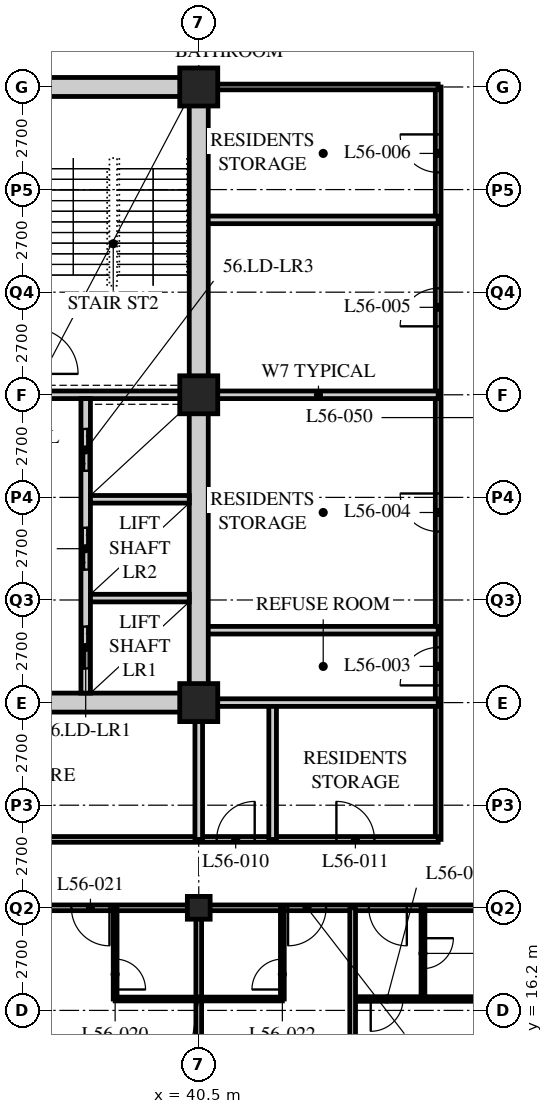
"""IFC4 building model, lengths in metres.
Left out: names, types, materials, properties, quantities, classifications, styles, units other than length and angle.
Written with IfcOpenShell. Run it as: python <this file> out.ifc"""

import sys

from ifc_helpers import new_model, si_unit, direction, frame, frame_2d, origin, origin_2d, place, context, subcontext, project, spatial, rectangle, hollow_rectangle, extrude, element, fill, save


model = new_model("IFC4")
c1 = context("Model", 3, precision=1e-05, world=origin(), true_north=direction((0.0, 1.0)))
c2 = subcontext(c1, "Body", "Model", "MODEL_VIEW")
j1 = project(units=[si_unit("LENGTHUNIT", "METRE"), si_unit("PLANEANGLEUNIT", "RADIAN")], contexts=[c1])
p1 = place(None, origin())
s1 = spatial("IfcSite", under=j1, at=p1, CompositionType="ELEMENT")
p2 = place(p1, origin())
s2 = spatial("IfcBuilding", under=s1, at=p2, CompositionType="ELEMENT")
p3 = place(p2, frame((0.0, 0.0, 217.2)))
s3 = spatial("IfcBuildingStorey", under=s2, at=p3, CompositionType="ELEMENT", Elevation=217.2)
p4 = place(p3, frame((40.5, 18.9, 0.0), z_axis=(0.0, 0.0, 1.0), x_axis=(1.0, 0.0, 0.0)))
e1 = element("IfcColumn", 1, at=p4, inside=s3, PredefinedType="COLUMN", context=c2, shape_type="SweptSolid", body=[
    extrude(hollow_rectangle(XDim=0.6, YDim=0.6, WallThickness=0.05, at=origin_2d()), origin(), (0.0, 0.0, 1.0), 3.6),
])
for number, where, z_axis, x_axis in (
    (2, (40.5, 24.3, 0.0), (0.0, 0.0, 1.0), (1.0, 0.0, 0.0)),
    (3, (40.5, 32.4, 0.0), (0.0, 0.0, 1.0), (1.0, 0.0, 0.0)),
    (4, (40.5, 40.5, 0.0), (0.0, 0.0, 1.0), (1.0, 0.0, 0.0)),
):
    element("IfcColumn", number, at=place(p3, frame(where, z_axis=z_axis, x_axis=x_axis)), inside=s3, PredefinedType="COLUMN", context=c2, shape_type="SweptSolid", body=[
        extrude(hollow_rectangle(XDim=1.0, YDim=1.0, WallThickness=0.1, at=origin_2d()), origin(), (0.0, 0.0, 1.0), 3.6),
    ])
p5 = place(p3, frame((12.15, 18.9, 0.0), z_axis=(0.0, 0.0, 1.0), x_axis=(1.0, 0.0, 0.0)))
e5 = element("IfcWall", 5, at=p5, inside=s3, PredefinedType="PARTITIONING", context=c2, shape_type="SweptSolid", body=[
    extrude(rectangle(XDim=36.45, YDim=0.15, at=frame_2d((18.225, 0.0))), origin(), (0.0, 0.0, 1.0), 2.778),
])
p6 = place(p5, frame((4.95, 0.0, 0.0)))
e6 = element("IfcOpeningElement", 6, at=p6, cuts=e5, PredefinedType="OPENING", context=c2, shape_type="SweptSolid", body=[
    extrude(rectangle(XDim=1.0, YDim=2.1, at=frame_2d((0.5, 1.05))), frame((0.0, 0.085, 0.0), z_axis=(0.0, -1.0, 0.0), x_axis=(1.0, 0.0, 0.0)), (0.0, 0.0, 1.0), 0.17),
])
p7 = place(p5, frame((22.6, 0.0, 0.0)))
e7 = element("IfcOpeningElement", 7, at=p7, cuts=e5, PredefinedType="OPENING", context=c2, shape_type="SweptSolid", body=[
    extrude(rectangle(XDim=1.0, YDim=2.1, at=frame_2d((0.5, 1.05))), frame((0.0, 0.085, 0.0), z_axis=(0.0, -1.0, 0.0), x_axis=(1.0, 0.0, 0.0)), (0.0, 0.0, 1.0), 0.17),
])
p8 = place(p5, frame((25.0, 0.0, 0.0)))
e8 = element("IfcOpeningElement", 8, at=p8, cuts=e5, PredefinedType="OPENING", context=c2, shape_type="SweptSolid", body=[
    extrude(rectangle(XDim=1.0, YDim=2.1, at=frame_2d((0.5, 1.05))), frame((0.0, 0.085, 0.0), z_axis=(0.0, -1.0, 0.0), x_axis=(1.0, 0.0, 0.0)), (0.0, 0.0, 1.0), 0.17),
])
p9 = place(p5, frame((30.7, 0.0, 0.0)))
e9 = element("IfcOpeningElement", 9, at=p9, cuts=e5, PredefinedType="OPENING", context=c2, shape_type="SweptSolid", body=[
    extrude(rectangle(XDim=1.0, YDim=2.1, at=frame_2d((0.5, 1.05))), frame((0.0, 0.085, 0.0), z_axis=(0.0, -1.0, 0.0), x_axis=(1.0, 0.0, 0.0)), (0.0, 0.0, 1.0), 0.17),
])
p10 = place(p5, frame((1.525, 0.0, 0.0)))
e10 = element("IfcOpeningElement", 10, at=p10, cuts=e5, PredefinedType="OPENING", context=c2, shape_type="SweptSolid", body=[
    extrude(rectangle(XDim=1.0, YDim=2.1, at=frame_2d((0.5, 1.05))), frame((0.0, 0.085, 0.0), z_axis=(0.0, -1.0, 0.0), x_axis=(1.0, 0.0, 0.0)), (0.0, 0.0, 1.0), 0.17),
])
p11 = place(p5, frame((32.825, 0.0, 0.0)))
e11 = element("IfcOpeningElement", 11, at=p11, cuts=e5, PredefinedType="OPENING", context=c2, shape_type="SweptSolid", body=[
    extrude(rectangle(XDim=1.0, YDim=2.1, at=frame_2d((0.5, 1.05))), frame((0.0, 0.085, 0.0), z_axis=(0.0, -1.0, 0.0), x_axis=(1.0, 0.0, 0.0)), (0.0, 0.0, 1.0), 0.17),
])
p12 = place(p3, frame((46.8, 20.7, 0.0), z_axis=(0.0, 0.0, 1.0), x_axis=(0.0, 1.0, 0.0)))
e12 = element("IfcWall", 12, at=p12, inside=s3, PredefinedType="PARTITIONING", context=c2, shape_type="SweptSolid", body=[
    extrude(rectangle(XDim=19.8, YDim=0.15, at=frame_2d((9.9, 0.0))), origin(), (0.0, 0.0, 1.0), 3.39),
])
p13 = place(p12, frame((4.052, 0.0, 0.0)))
e13 = element("IfcOpeningElement", 13, at=p13, cuts=e12, PredefinedType="OPENING", context=c2, shape_type="SweptSolid", body=[
    extrude(rectangle(XDim=1.0, YDim=2.1, at=frame_2d((0.5, 1.05))), frame((0.0, 0.085, 0.0), z_axis=(0.0, -1.0, 0.0), x_axis=(1.0, 0.0, 0.0)), (0.0, 0.0, 1.0), 0.17),
])
p14 = place(p12, frame((8.102, 0.0, 0.0)))
e14 = element("IfcOpeningElement", 14, at=p14, cuts=e12, PredefinedType="OPENING", context=c2, shape_type="SweptSolid", body=[
    extrude(rectangle(XDim=1.0, YDim=2.1, at=frame_2d((0.5, 1.05))), frame((0.0, 0.085, 0.0), z_axis=(0.0, -1.0, 0.0), x_axis=(1.0, 0.0, 0.0)), (0.0, 0.0, 1.0), 0.17),
])
p15 = place(p12, frame((13.502, 0.0, 0.0)))
e15 = element("IfcOpeningElement", 15, at=p15, cuts=e12, PredefinedType="OPENING", context=c2, shape_type="SweptSolid", body=[
    extrude(rectangle(XDim=1.0, YDim=2.1, at=frame_2d((0.5, 1.05))), frame((0.0, 0.085, 0.0), z_axis=(0.0, -1.0, 0.0), x_axis=(1.0, 0.0, 0.0)), (0.0, 0.0, 1.0), 0.17),
])
p16 = place(p12, frame((17.552, 0.0, 0.0)))
e16 = element("IfcOpeningElement", 16, at=p16, cuts=e12, PredefinedType="OPENING", context=c2, shape_type="SweptSolid", body=[
    extrude(rectangle(XDim=1.0, YDim=2.1, at=frame_2d((0.5, 1.05))), frame((0.0, 0.085, 0.0), z_axis=(0.0, -1.0, 0.0), x_axis=(1.0, 0.0, 0.0)), (0.0, 0.0, 1.0), 0.17),
])
p17 = place(p3, frame((46.8, 40.5, 0.0), z_axis=(0.0, 0.0, 1.0), x_axis=(-1.0, 0.0, 0.0)))
e17 = element("IfcWall", 17, at=p17, inside=s3, PredefinedType="PARTITIONING", context=c2, shape_type="SweptSolid", body=[
    extrude(rectangle(XDim=6.1, YDim=0.15, at=frame_2d((3.05, 0.0))), origin(), (0.0, 0.0, 1.0), 3.39),
])
p18 = place(p3, frame((29.56, 20.7, 0.0), z_axis=(0.0, 0.0, 1.0), x_axis=(1.0, 0.0, 0.0)))
e18 = element("IfcWall", 18, at=p18, inside=s3, PredefinedType="PARTITIONING", context=c2, shape_type="SweptSolid", body=[
    extrude(rectangle(XDim=17.24, YDim=0.15, at=frame_2d((8.62, 0.0))), origin(), (0.0, 0.0, 1.0), 3.39),
])
p19 = place(p18, frame((4.965, 0.0, 0.0)))
e19 = element("IfcOpeningElement", 19, at=p19, cuts=e18, PredefinedType="OPENING", context=c2, shape_type="SweptSolid", body=[
    extrude(rectangle(XDim=1.0, YDim=2.1, at=frame_2d((0.5, 1.05))), frame((0.0, 0.085, 0.0), z_axis=(0.0, -1.0, 0.0), x_axis=(1.0, 0.0, 0.0)), (0.0, 0.0, 1.0), 0.17),
])
p20 = place(p18, frame((11.412, 0.0, 0.0)))
e20 = element("IfcOpeningElement", 20, at=p20, cuts=e18, PredefinedType="OPENING", context=c2, shape_type="SweptSolid", body=[
    extrude(rectangle(XDim=1.0, YDim=2.1, at=frame_2d((0.5, 1.05))), frame((0.0, 0.085, 0.0), z_axis=(0.0, -1.0, 0.0), x_axis=(1.0, 0.0, 0.0)), (0.0, 0.0, 1.0), 0.17),
])
p21 = place(p18, frame((14.562, 0.0, 0.0)))
e21 = element("IfcOpeningElement", 21, at=p21, cuts=e18, PredefinedType="OPENING", context=c2, shape_type="SweptSolid", body=[
    extrude(rectangle(XDim=1.0, YDim=2.1, at=frame_2d((0.5, 1.05))), frame((0.0, 0.085, 0.0), z_axis=(0.0, -1.0, 0.0), x_axis=(1.0, 0.0, 0.0)), (0.0, 0.0, 1.0), 0.17),
])
for number, where, z_axis, x_axis in (
    (22, (40.5, 32.4, 0.0), (0.0, 0.0, 1.0), (1.0, 0.0, 0.0)),
    (23, (46.8, 26.205, 0.0), (0.0, 0.0, 1.0), (-1.0, 0.0, 0.0)),
    (24, (46.8, 37.003, 0.0), (0.0, 0.0, 1.0), (-1.0, 0.0, 0.0)),
):
    element("IfcWall", number, at=place(p3, frame(where, z_axis=z_axis, x_axis=x_axis)), inside=s3, PredefinedType="SOLIDWALL", context=c2, shape_type="SweptSolid", body=[
        extrude(rectangle(XDim=6.3, YDim=0.2, at=frame_2d((3.15, 0.0))), origin(), (0.0, 0.0, 1.0), 3.39),
    ])
p22 = place(p3, frame((40.5, 20.7, 0.0), z_axis=(0.0, 0.0, 1.0), x_axis=(0.0, 1.0, 0.0)))
e25 = element("IfcWall", 25, at=p22, inside=s3, PredefinedType="SOLIDWALL", context=c2, shape_type="SweptSolid", body=[
    extrude(rectangle(XDim=3.6, YDim=0.2, at=frame_2d((1.8, 0.0))), origin(), (0.0, 0.0, 1.0), 2.778),
])
p23 = place(p3, frame((42.444, 20.7, 0.0), z_axis=(0.0, 0.0, 1.0), x_axis=(0.0, 1.0, 0.0)))
e26 = element("IfcWall", 26, at=p23, inside=s3, PredefinedType="SOLIDWALL", context=c2, shape_type="SweptSolid", body=[
    extrude(rectangle(XDim=3.6, YDim=0.2, at=frame_2d((1.8, 0.0))), origin(), (0.0, 0.0, 1.0), 3.39),
])
p24 = place(p3, frame((40.5, 24.3, 0.0), z_axis=(0.0, 0.0, 1.0), x_axis=(1.0, 0.0, 0.0)))
e27 = element("IfcWall", 27, at=p24, inside=s3, PredefinedType="SOLIDWALL", context=c2, shape_type="SweptSolid", body=[
    extrude(rectangle(XDim=6.3, YDim=0.2, at=frame_2d((3.15, 0.0))), origin(), (0.0, 0.0, 1.0), 3.39),
])
p25 = place(p3, frame((38.3, 16.5, 0.0), z_axis=(0.0, 0.0, 1.0), x_axis=(1.0, 0.0, 0.0)))
e28 = element("IfcWall", 28, at=p25, inside=s3, PredefinedType="PARTITIONING", context=c2, shape_type="SweptSolid", body=[
    extrude(rectangle(XDim=4.4, YDim=0.1, at=frame_2d((2.2, 0.0))), origin(), (0.0, 0.0, 1.0), 3.39),
])
p26 = place(p3, frame((38.3, 18.9, 0.0), z_axis=(0.0, 0.0, 1.0), x_axis=(0.0, -1.0, 0.0)))
e29 = element("IfcWall", 29, at=p26, inside=s3, PredefinedType="PARTITIONING", context=c2, shape_type="SweptSolid", body=[
    extrude(rectangle(XDim=2.4, YDim=0.1, at=frame_2d((1.2, 0.0))), origin(), (0.0, 0.0, 1.0), 3.39),
])
p27 = place(p26, frame((1.35, 0.0, 0.0)))
e30 = element("IfcOpeningElement", 30, at=p27, cuts=e29, PredefinedType="OPENING", context=c2, shape_type="SweptSolid", body=[
    extrude(rectangle(XDim=0.8, YDim=2.1, at=frame_2d((0.4, 1.05))), frame((0.0, 0.06, 0.0), z_axis=(0.0, -1.0, 0.0), x_axis=(1.0, 0.0, 0.0)), (0.0, 0.0, 1.0), 0.12),
])
p28 = place(p3, frame((40.5, 18.9, 0.0), z_axis=(0.0, 0.0, 1.0), x_axis=(0.0, -1.0, 0.0)))
e31 = element("IfcWall", 31, at=p28, inside=s3, PredefinedType="PARTITIONING", context=c2, shape_type="SweptSolid", body=[
    extrude(rectangle(XDim=7.8, YDim=0.15, at=frame_2d((3.9, 0.0))), origin(), (0.0, 0.0, 1.0), 2.778),
])
p29 = place(p3, frame((42.7, 18.9, 0.0), z_axis=(0.0, 0.0, 1.0), x_axis=(0.0, -1.0, 0.0)))
e32 = element("IfcWall", 32, at=p29, inside=s3, PredefinedType="PARTITIONING", context=c2, shape_type="SweptSolid", body=[
    extrude(rectangle(XDim=2.4, YDim=0.1, at=frame_2d((1.2, 0.0))), origin(), (0.0, 0.0, 1.0), 3.39),
])
p30 = place(p29, frame((1.35, 0.0, 0.0)))
e33 = element("IfcOpeningElement", 33, at=p30, cuts=e32, PredefinedType="OPENING", context=c2, shape_type="SweptSolid", body=[
    extrude(rectangle(XDim=0.8, YDim=2.1, at=frame_2d((0.4, 1.05))), frame((0.0, 0.06, 0.0), z_axis=(0.0, -1.0, 0.0), x_axis=(1.0, 0.0, 0.0)), (0.0, 0.0, 1.0), 0.12),
])
p31 = place(p3, frame((44.55, 16.5, 0.0), z_axis=(0.0, 0.0, 1.0), x_axis=(1.0, 0.0, 0.0)))
e34 = element("IfcWall", 34, at=p31, inside=s3, PredefinedType="PARTITIONING", context=c2, shape_type="SweptSolid", body=[
    extrude(rectangle(XDim=4.05, YDim=0.12, at=frame_2d((2.025, 0.0))), origin(), (0.0, 0.0, 1.0), 3.39),
])
p32 = place(p31, frame((0.475, 0.0, 0.0)))
e35 = element("IfcOpeningElement", 35, at=p32, cuts=e34, PredefinedType="OPENING", context=c2, shape_type="SweptSolid", body=[
    extrude(rectangle(XDim=0.85, YDim=2.1, at=frame_2d((0.425, 1.05))), frame((0.0, 0.07, 0.0), z_axis=(0.0, -1.0, 0.0), x_axis=(1.0, 0.0, 0.0)), (0.0, 0.0, 1.0), 0.14),
])
p33 = place(p3, frame((46.4, 18.9, 0.0), z_axis=(0.0, 0.0, 1.0), x_axis=(0.0, -1.0, 0.0)))
e36 = element("IfcWall", 36, at=p33, inside=s3, PredefinedType="PARTITIONING", context=c2, shape_type="SweptSolid", body=[
    extrude(rectangle(XDim=2.4, YDim=0.1, at=frame_2d((1.2, 0.0))), origin(), (0.0, 0.0, 1.0), 3.39),
])
p34 = place(p33, frame((0.8, 0.0, 0.0)))
e37 = element("IfcOpeningElement", 37, at=p34, cuts=e36, PredefinedType="OPENING", context=c2, shape_type="SweptSolid", body=[
    extrude(rectangle(XDim=0.8, YDim=2.1, at=frame_2d((0.4, 1.05))), frame((0.0, 0.06, 0.0), z_axis=(0.0, -1.0, 0.0), x_axis=(1.0, 0.0, 0.0)), (0.0, 0.0, 1.0), 0.12),
])
p35 = place(p3, frame((44.55, 18.9, 0.0), z_axis=(0.0, 0.0, 1.0), x_axis=(0.0, -1.0, 0.0)))
e38 = element("IfcWall", 38, at=p35, inside=s3, PredefinedType="PARTITIONING", context=c2, shape_type="SweptSolid", body=[
    extrude(rectangle(XDim=7.8, YDim=0.15, at=frame_2d((3.9, 0.0))), origin(), (0.0, 0.0, 1.0), 3.39),
])
p36 = place(p3, frame((15.95, 24.3, 0.0), z_axis=(0.0, 0.0, 1.0), x_axis=(1.0, 0.0, 0.0)))
e39 = element("IfcWall", 39, at=p36, inside=s3, PredefinedType="SOLIDWALL", context=c2, shape_type="SweptSolid", body=[
    extrude(rectangle(XDim=24.8, YDim=0.5, at=frame_2d((12.4, 0.0))), origin(), (0.0, 0.0, 1.0), 2.74),
])
p37 = place(p36, frame((11.5, 0.0, 0.0)))
e40 = element("IfcOpeningElement", 40, at=p37, cuts=e39, PredefinedType="OPENING", context=c2, shape_type="SweptSolid", body=[
    extrude(rectangle(XDim=1.8, YDim=2.4, at=frame_2d((0.9, 1.2))), frame((0.0, 0.26, 0.0), z_axis=(0.0, -1.0, 0.0), x_axis=(1.0, 0.0, 0.0)), (0.0, 0.0, 1.0), 0.52),
])
p38 = place(p3, frame((15.95, 40.5, 0.0), z_axis=(0.0, 0.0, 1.0), x_axis=(1.0, 0.0, 0.0)))
e41 = element("IfcWall", 41, at=p38, inside=s3, PredefinedType="SOLIDWALL", context=c2, shape_type="SweptSolid", body=[
    extrude(rectangle(XDim=24.8, YDim=0.5, at=frame_2d((12.4, 0.0))), origin(), (0.0, 0.0, 1.0), 2.74),
])
p39 = place(p38, frame((11.5, 0.0, 0.0)))
e42 = element("IfcOpeningElement", 42, at=p39, cuts=e41, PredefinedType="OPENING", context=c2, shape_type="SweptSolid", body=[
    extrude(rectangle(XDim=1.8, YDim=2.4, at=frame_2d((0.9, 1.2))), frame((0.0, 0.26, 0.0), z_axis=(0.0, -1.0, 0.0), x_axis=(1.0, 0.0, 0.0)), (0.0, 0.0, 1.0), 0.52),
])
p40 = place(p3, frame((40.5, 24.55, 0.0), z_axis=(0.0, 0.0, 1.0), x_axis=(0.0, 1.0, 0.0)))
e43 = element("IfcWall", 43, at=p40, inside=s3, PredefinedType="SOLIDWALL", context=c2, shape_type="SweptSolid", body=[
    extrude(rectangle(XDim=15.7, YDim=0.5, at=frame_2d((7.85, 0.0))), origin(), (0.0, 0.0, 1.0), 2.778),
])
p41 = place(p3, frame((32.3, 32.4, 0.0), z_axis=(0.0, 0.0, 1.0), x_axis=(1.0, 0.0, 0.0)))
e44 = element("IfcWall", 44, at=p41, inside=s3, PredefinedType="SOLIDWALL", context=c2, shape_type="SweptSolid", body=[
    extrude(rectangle(XDim=7.95, YDim=0.2, at=frame_2d((3.975, 0.0))), origin(), (0.0, 0.0, 1.0), 2.778),
])
p42 = place(p3, frame((37.525, 24.55, 0.0), z_axis=(0.0, 0.0, 1.0), x_axis=(0.0, 1.0, 0.0)))
e45 = element("IfcWall", 45, at=p42, inside=s3, PredefinedType="SOLIDWALL", context=c2, shape_type="SweptSolid", body=[
    extrude(rectangle(XDim=7.75, YDim=0.25, at=frame_2d((3.875, 0.0))), origin(), (0.0, 0.0, 1.0), 3.39),
])
p43 = place(p42, frame((0.65, 0.0, 0.0)))
e46 = element("IfcOpeningElement", 46, at=p43, cuts=e45, PredefinedType="OPENING", context=c2, shape_type="SweptSolid", body=[
    extrude(rectangle(XDim=1.1, YDim=2.4, at=frame_2d((0.55, 1.2))), frame((0.0, 0.135, 0.0), z_axis=(0.0, -1.0, 0.0), x_axis=(1.0, 0.0, 0.0)), (0.0, 0.0, 1.0), 0.27),
])
p44 = place(p42, frame((3.25, 0.0, 0.0)))
e47 = element("IfcOpeningElement", 47, at=p44, cuts=e45, PredefinedType="OPENING", context=c2, shape_type="SweptSolid", body=[
    extrude(rectangle(XDim=1.1, YDim=2.4, at=frame_2d((0.55, 1.2))), frame((0.0, 0.135, 0.0), z_axis=(0.0, -1.0, 0.0), x_axis=(1.0, 0.0, 0.0)), (0.0, 0.0, 1.0), 0.27),
])
p45 = place(p42, frame((5.85, 0.0, 0.0)))
e48 = element("IfcOpeningElement", 48, at=p45, cuts=e45, PredefinedType="OPENING", context=c2, shape_type="SweptSolid", body=[
    extrude(rectangle(XDim=1.1, YDim=2.4, at=frame_2d((0.55, 1.2))), frame((0.0, 0.135, 0.0), z_axis=(0.0, -1.0, 0.0), x_axis=(1.0, 0.0, 0.0)), (0.0, 0.0, 1.0), 0.27),
])
for number, where, z_axis, x_axis in (
    (49, (37.65, 27.05, 0.0), (0.0, 0.0, 1.0), (1.0, 0.0, 0.0)),
    (50, (37.65, 29.65, 0.0), (0.0, 0.0, 1.0), (1.0, 0.0, 0.0)),
):
    element("IfcWall", number, at=place(p3, frame(where, z_axis=z_axis, x_axis=x_axis)), inside=s3, PredefinedType="SOLIDWALL", context=c2, shape_type="SweptSolid", body=[
        extrude(rectangle(XDim=2.6, YDim=0.2, at=frame_2d((1.3, 0.0))), origin(), (0.0, 0.0, 1.0), 3.39),
    ])
p46 = place(p13, origin())
e51 = element("IfcDoor", 51, at=p46, inside=s3, OperationType="SINGLE_SWING_LEFT", PredefinedType="DOOR", context=c2, shape_type="SweptSolid", body=[
    extrude(rectangle(XDim=1.0, YDim=2.1, at=frame_2d((0.5, 1.05))), frame((0.0, 0.025, 0.0), z_axis=(0.0, -1.0, 0.0), x_axis=(1.0, 0.0, 0.0)), (0.0, 0.0, 1.0), 0.05),
])
fill(e13, e51)
p47 = place(p14, origin())
e52 = element("IfcDoor", 52, at=p47, inside=s3, OperationType="SINGLE_SWING_RIGHT", PredefinedType="DOOR", context=c2, shape_type="SweptSolid", body=[
    extrude(rectangle(XDim=1.0, YDim=2.1, at=frame_2d((0.5, 1.05))), frame((0.0, 0.025, 0.0), z_axis=(0.0, -1.0, 0.0), x_axis=(1.0, 0.0, 0.0)), (0.0, 0.0, 1.0), 0.05),
])
fill(e14, e52)
p48 = place(p15, origin())
e53 = element("IfcDoor", 53, at=p48, inside=s3, OperationType="SINGLE_SWING_LEFT", PredefinedType="DOOR", context=c2, shape_type="SweptSolid", body=[
    extrude(rectangle(XDim=1.0, YDim=2.1, at=frame_2d((0.5, 1.05))), frame((0.0, 0.025, 0.0), z_axis=(0.0, -1.0, 0.0), x_axis=(1.0, 0.0, 0.0)), (0.0, 0.0, 1.0), 0.05),
])
fill(e15, e53)
p49 = place(p16, origin())
e54 = element("IfcDoor", 54, at=p49, inside=s3, OperationType="SINGLE_SWING_RIGHT", PredefinedType="DOOR", context=c2, shape_type="SweptSolid", body=[
    extrude(rectangle(XDim=1.0, YDim=2.1, at=frame_2d((0.5, 1.05))), frame((0.0, 0.025, 0.0), z_axis=(0.0, -1.0, 0.0), x_axis=(1.0, 0.0, 0.0)), (0.0, 0.0, 1.0), 0.05),
])
fill(e16, e54)
p50 = place(p20, origin())
e55 = element("IfcDoor", 55, at=p50, inside=s3, OperationType="SINGLE_SWING_RIGHT", PredefinedType="DOOR", context=c2, shape_type="SweptSolid", body=[
    extrude(rectangle(XDim=1.0, YDim=2.1, at=frame_2d((0.5, 1.05))), frame((0.0, 0.025, 0.0), z_axis=(0.0, -1.0, 0.0), x_axis=(1.0, 0.0, 0.0)), (0.0, 0.0, 1.0), 0.05),
])
fill(e20, e55)
p51 = place(p21, origin())
e56 = element("IfcDoor", 56, at=p51, inside=s3, OperationType="SINGLE_SWING_LEFT", PredefinedType="DOOR", context=c2, shape_type="SweptSolid", body=[
    extrude(rectangle(XDim=1.0, YDim=2.1, at=frame_2d((0.5, 1.05))), frame((0.0, 0.025, 0.0), z_axis=(0.0, -1.0, 0.0), x_axis=(1.0, 0.0, 0.0)), (0.0, 0.0, 1.0), 0.05),
])
fill(e21, e56)
p52 = place(p27, origin())
e57 = element("IfcDoor", 57, at=p52, inside=s3, OperationType="SINGLE_SWING_RIGHT", PredefinedType="DOOR", context=c2, shape_type="SweptSolid", body=[
    extrude(rectangle(XDim=0.8, YDim=2.1, at=frame_2d((0.4, 1.05))), frame((0.0, 0.025, 0.0), z_axis=(0.0, -1.0, 0.0), x_axis=(1.0, 0.0, 0.0)), (0.0, 0.0, 1.0), 0.05),
])
fill(e30, e57)
p53 = place(p8, origin())
e58 = element("IfcDoor", 58, at=p53, inside=s3, OperationType="SINGLE_SWING_LEFT", PredefinedType="DOOR", context=c2, shape_type="SweptSolid", body=[
    extrude(rectangle(XDim=1.0, YDim=2.1, at=frame_2d((0.5, 1.05))), frame((0.0, 0.025, 0.0), z_axis=(0.0, -1.0, 0.0), x_axis=(1.0, 0.0, 0.0)), (0.0, 0.0, 1.0), 0.05),
])
fill(e8, e58)
p54 = place(p30, origin())
e59 = element("IfcDoor", 59, at=p54, inside=s3, OperationType="SINGLE_SWING_LEFT", PredefinedType="DOOR", context=c2, shape_type="SweptSolid", body=[
    extrude(rectangle(XDim=0.8, YDim=2.1, at=frame_2d((0.4, 1.05))), frame((0.0, 0.025, 0.0), z_axis=(0.0, -1.0, 0.0), x_axis=(1.0, 0.0, 0.0)), (0.0, 0.0, 1.0), 0.05),
])
fill(e33, e59)
p55 = place(p9, origin())
e60 = element("IfcDoor", 60, at=p55, inside=s3, OperationType="SINGLE_SWING_RIGHT", PredefinedType="DOOR", context=c2, shape_type="SweptSolid", body=[
    extrude(rectangle(XDim=1.0, YDim=2.1, at=frame_2d((0.5, 1.05))), frame((0.0, 0.025, 0.0), z_axis=(0.0, -1.0, 0.0), x_axis=(1.0, 0.0, 0.0)), (0.0, 0.0, 1.0), 0.05),
])
fill(e9, e60)
p56 = place(p34, origin())
e61 = element("IfcDoor", 61, at=p56, inside=s3, OperationType="SINGLE_SWING_LEFT", PredefinedType="DOOR", context=c2, shape_type="SweptSolid", body=[
    extrude(rectangle(XDim=0.8, YDim=2.1, at=frame_2d((0.4, 1.05))), frame((0.0, 0.025, 0.0), z_axis=(0.0, -1.0, 0.0), x_axis=(1.0, 0.0, 0.0)), (0.0, 0.0, 1.0), 0.05),
])
fill(e37, e61)
p57 = place(p11, origin())
e62 = element("IfcDoor", 62, at=p57, inside=s3, OperationType="SINGLE_SWING_LEFT", PredefinedType="DOOR", context=c2, shape_type="SweptSolid", body=[
    extrude(rectangle(XDim=1.0, YDim=2.1, at=frame_2d((0.5, 1.05))), frame((0.0, 0.025, 0.0), z_axis=(0.0, -1.0, 0.0), x_axis=(1.0, 0.0, 0.0)), (0.0, 0.0, 1.0), 0.05),
])
fill(e11, e62)
p58 = place(p32, origin())
e63 = element("IfcDoor", 63, at=p58, inside=s3, OperationType="SINGLE_SWING_RIGHT", PredefinedType="DOOR", context=c2, shape_type="SweptSolid", body=[
    extrude(rectangle(XDim=0.85, YDim=2.1, at=frame_2d((0.425, 1.05))), frame((0.0, 0.025, 0.0), z_axis=(0.0, -1.0, 0.0), x_axis=(1.0, 0.0, 0.0)), (0.0, 0.0, 1.0), 0.05),
])
fill(e35, e63)
p59 = place(p43, origin())
e64 = element("IfcDoor", 64, at=p59, inside=s3, OperationType="DOUBLE_DOOR_SLIDING", PredefinedType="DOOR", context=c2, shape_type="SweptSolid", body=[
    extrude(rectangle(XDim=1.1, YDim=2.4, at=frame_2d((0.55, 1.2))), frame((0.0, 0.025, 0.0), z_axis=(0.0, -1.0, 0.0), x_axis=(1.0, 0.0, 0.0)), (0.0, 0.0, 1.0), 0.05),
])
fill(e46, e64)
p60 = place(p44, origin())
e65 = element("IfcDoor", 65, at=p60, inside=s3, OperationType="DOUBLE_DOOR_SLIDING", PredefinedType="DOOR", context=c2, shape_type="SweptSolid", body=[
    extrude(rectangle(XDim=1.1, YDim=2.4, at=frame_2d((0.55, 1.2))), frame((0.0, 0.025, 0.0), z_axis=(0.0, -1.0, 0.0), x_axis=(1.0, 0.0, 0.0)), (0.0, 0.0, 1.0), 0.05),
])
fill(e47, e65)
p61 = place(p45, origin())
e66 = element("IfcDoor", 66, at=p61, inside=s3, OperationType="DOUBLE_DOOR_SLIDING", PredefinedType="DOOR", context=c2, shape_type="SweptSolid", body=[
    extrude(rectangle(XDim=1.1, YDim=2.4, at=frame_2d((0.55, 1.2))), frame((0.0, 0.025, 0.0), z_axis=(0.0, -1.0, 0.0), x_axis=(1.0, 0.0, 0.0)), (0.0, 0.0, 1.0), 0.05),
])
fill(e48, e66)
save(model, sys.argv[1])
